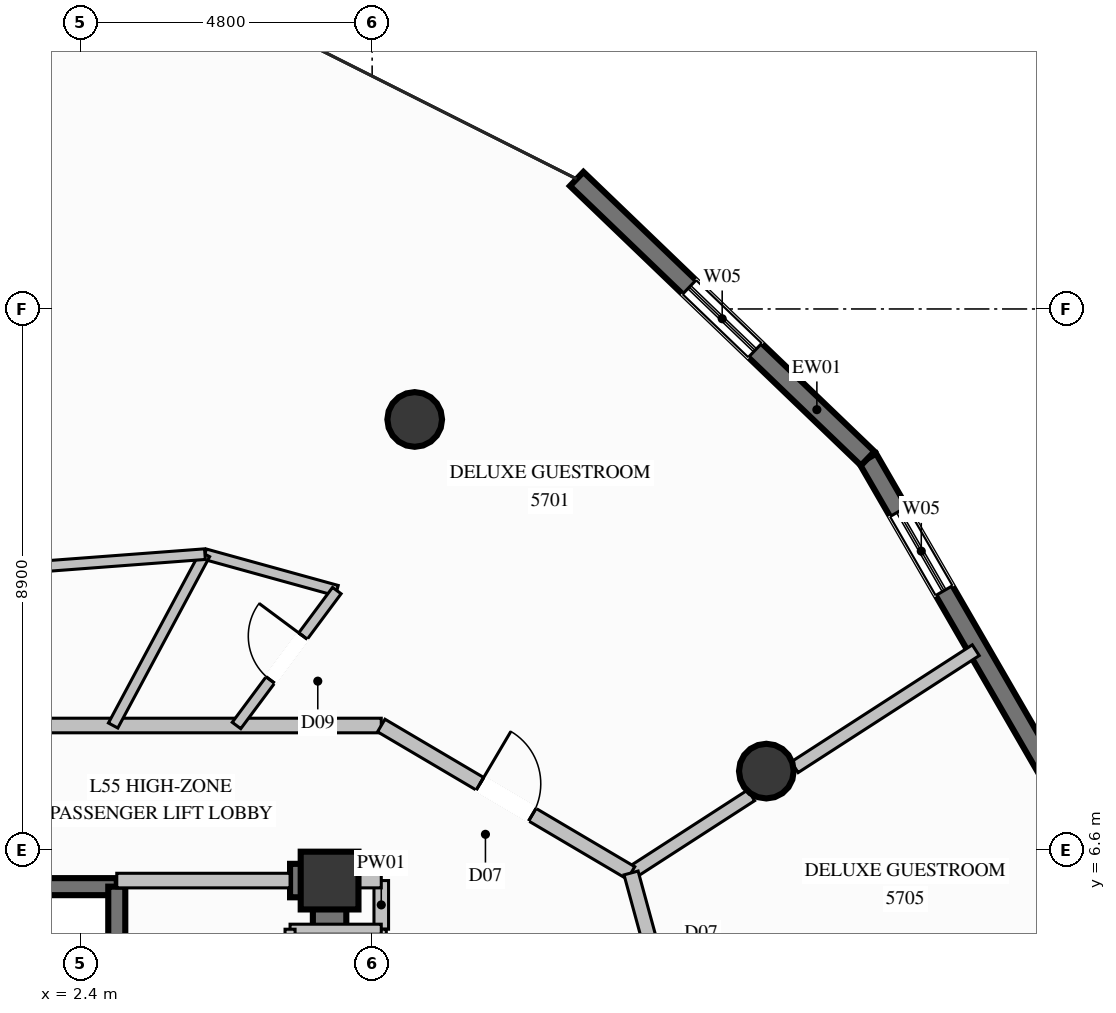
"""IFC4 building model, lengths in metres.
Left out: names, types, materials, properties, quantities, classifications, styles, units other than length and angle.
Written with IfcOpenShell. Run it as: python <this file> out.ifc"""

import sys

from ifc_helpers import new_model, si_unit, direction, frame, frame_2d, origin, origin_2d, place, context, subcontext, project, spatial, rectangle, circle, extrude, element, fill, save


model = new_model("IFC4")
c1 = context("Model", 3, precision=1e-05, world=origin(), true_north=direction((0.0, 1.0)))
c2 = subcontext(c1, "Body", "Model", "MODEL_VIEW")
j1 = project(units=[si_unit("LENGTHUNIT", "METRE"), si_unit("PLANEANGLEUNIT", "RADIAN")], contexts=[c1])
p1 = place(None, origin())
s1 = spatial("IfcSite", under=j1, at=p1, CompositionType="ELEMENT")
p2 = place(p1, origin())
s2 = spatial("IfcBuilding", under=s1, at=p2, CompositionType="ELEMENT")
p3 = place(p2, frame((0.0, 0.0, 212.8)))
s3 = spatial("IfcBuildingStorey", under=s2, at=p3, CompositionType="ELEMENT", Elevation=212.8)
p4 = place(p3, frame((6.5, 6.1, 0.0), z_axis=(0.0, 0.0, 1.0), x_axis=(1.0, 0.0, 0.0)))
e1 = element("IfcColumn", 1, at=p4, inside=s3, PredefinedType="COLUMN", context=c2, shape_type="SweptSolid", body=[
    extrude(rectangle(XDim=0.95, YDim=0.95, at=origin_2d()), origin(), (0.0, 0.0, 1.0), 3.6),
])
p5 = place(p3, frame((5.85, 6.1, 0.0), z_axis=(0.0, 0.0, 1.0), x_axis=(1.0, 0.0, 0.0)))
e2 = element("IfcWall", 2, at=p5, inside=s3, PredefinedType="SHEAR", context=c2, shape_type="SweptSolid", body=[
    extrude(rectangle(XDim=0.375, YDim=0.55, at=frame_2d((0.188, 0.0))), origin(), (0.0, 0.0, 1.0), 3.6),
])
p6 = place(p3, frame((6.5, 3.35, 0.0), z_axis=(0.0, 0.0, 1.0), x_axis=(0.0, 1.0, 0.0)))
e3 = element("IfcWall", 3, at=p6, inside=s3, PredefinedType="SHEAR", context=c2, shape_type="SweptSolid", body=[
    extrude(rectangle(XDim=3.025, YDim=0.55, at=frame_2d((1.512, 0.0))), origin(), (0.0, 0.0, 1.0), 3.6),
])
for number, where, z_axis, x_axis in (
    (4, (13.683, 7.9, 0.0), (0.0, 0.0, 1.0), (1.0, 0.0, 0.0)),
    (5, (7.9, 13.683, 0.0), (0.0, 0.0, 1.0), (1.0, 0.0, 0.0)),
):
    element("IfcColumn", number, at=place(p3, frame(where, z_axis=z_axis, x_axis=x_axis)), inside=s3, PredefinedType="COLUMN", context=c2, shape_type="SweptSolid", body=[
        extrude(circle(Radius=0.45, at=origin_2d()), origin(), (0.0, 0.0, 1.0), 3.6),
    ])
p7 = place(p3, frame((15.35, 13.041, 0.0), z_axis=(0.0, 0.0, 1.0), x_axis=(0.50061923795, -0.865667591281, 0.0)))
e6 = element("IfcWall", 6, at=p7, inside=s3, PredefinedType="SOLIDWALL", context=c2, shape_type="SweptSolid", body=[
    extrude(rectangle(XDim=6.786, YDim=0.32, at=frame_2d((3.393, 0.0))), origin(), (0.0, 0.0, 1.0), 3.36),
])
p8 = place(p7, frame((1.01, 0.0, 0.85)))
e7 = element("IfcOpeningElement", 7, at=p8, cuts=e6, PredefinedType="OPENING", context=c2, shape_type="SweptSolid", body=[
    extrude(rectangle(XDim=1.5, YDim=1.2, at=frame_2d((0.75, 0.6))), frame((0.0, 0.17, 0.0), z_axis=(0.0, -1.0, 0.0), x_axis=(1.0, 0.0, 0.0)), (0.0, 0.0, 1.0), 0.34),
])
p9 = place(p3, frame((10.564, 17.638, 0.0), z_axis=(0.0, 0.0, 1.0), x_axis=(0.721218944664, -0.69270717757, 0.0)))
e8 = element("IfcWall", 8, at=p9, inside=s3, PredefinedType="SOLIDWALL", context=c2, shape_type="SweptSolid", body=[
    extrude(rectangle(XDim=6.636, YDim=0.32, at=frame_2d((3.318, 0.0))), origin(), (0.0, 0.0, 1.0), 3.36),
])
p10 = place(p9, frame((2.568, 0.0, 0.85)))
e9 = element("IfcOpeningElement", 9, at=p10, cuts=e8, PredefinedType="OPENING", context=c2, shape_type="SweptSolid", body=[
    extrude(rectangle(XDim=1.5, YDim=1.2, at=frame_2d((0.75, 0.6))), frame((0.0, 0.17, 0.0), z_axis=(0.0, -1.0, 0.0), x_axis=(1.0, 0.0, 0.0)), (0.0, 0.0, 1.0), 0.34),
])
p11 = place(p3, frame((3.0, 6.0, 0.0), z_axis=(0.0, 0.0, 1.0), x_axis=(-1.0, 0.0, 0.0)))
e10 = element("IfcWall", 10, at=p11, inside=s3, PredefinedType="SOLIDWALL", context=c2, shape_type="SweptSolid", body=[
    extrude(rectangle(XDim=2.2, YDim=0.28, at=frame_2d((1.1, 0.0))), origin(), (0.0, 0.0, 1.0), 3.36),
])
p12 = place(p3, frame((3.0, 3.5, 0.0), z_axis=(0.0, 0.0, 1.0), x_axis=(0.0, 1.0, 0.0)))
e11 = element("IfcWall", 11, at=p12, inside=s3, PredefinedType="SOLIDWALL", context=c2, shape_type="SweptSolid", body=[
    extrude(rectangle(XDim=2.5, YDim=0.28, at=frame_2d((1.25, 0.0))), origin(), (0.0, 0.0, 1.0), 3.36),
])
p13 = place(p3, frame((-7.35, 8.65, 0.0), z_axis=(0.0, 0.0, 1.0), x_axis=(1.0, 0.0, 0.0)))
e12 = element("IfcWall", 12, at=p13, inside=s3, PredefinedType="PARTITIONING", context=c2, shape_type="SweptSolid", body=[
    extrude(rectangle(XDim=14.7, YDim=0.24, at=frame_2d((7.35, 0.0))), origin(), (0.0, 0.0, 1.0), 3.36),
])
p14 = place(p3, frame((3.0, 6.1, 0.0), z_axis=(0.0, 0.0, 1.0), x_axis=(1.0, 0.0, 0.0)))
e13 = element("IfcWall", 13, at=p14, inside=s3, PredefinedType="PARTITIONING", context=c2, shape_type="SweptSolid", body=[
    extrude(rectangle(XDim=2.85, YDim=0.24, at=frame_2d((1.425, 0.0))), origin(), (0.0, 0.0, 1.0), 2.445),
])
p15 = place(p3, frame((7.35, 5.3, 0.0), z_axis=(0.0, 0.0, 1.0), x_axis=(0.0, 1.0, 0.0)))
e14 = element("IfcWall", 14, at=p15, inside=s3, PredefinedType="PARTITIONING", context=c2, shape_type="SweptSolid", body=[
    extrude(rectangle(XDim=0.8, YDim=0.24, at=frame_2d((0.4, 0.0))), origin(), (0.0, 0.0, 1.0), 2.445),
])
p16 = place(p3, frame((6.5, 6.1, 0.0), z_axis=(0.0, 0.0, 1.0), x_axis=(1.0, 0.0, 0.0)))
e15 = element("IfcWall", 15, at=p16, inside=s3, PredefinedType="PARTITIONING", context=c2, shape_type="SweptSolid", body=[
    extrude(rectangle(XDim=0.85, YDim=0.24, at=frame_2d((0.425, 0.0))), origin(), (0.0, 0.0, 1.0), 2.876),
])
p17 = place(p3, frame((7.35, 2.75, 0.0), z_axis=(0.0, 0.0, 1.0), x_axis=(0.0, 1.0, 0.0)))
e16 = element("IfcWall", 16, at=p17, inside=s3, PredefinedType="PARTITIONING", context=c2, shape_type="SweptSolid", body=[
    extrude(rectangle(XDim=2.55, YDim=0.165, at=frame_2d((1.275, 0.0))), origin(), (0.0, 0.0, 1.0), 3.36),
])
p18 = place(p17, frame((0.8, 0.0, 0.0)))
e17 = element("IfcOpeningElement", 17, at=p18, cuts=e16, PredefinedType="OPENING", context=c2, shape_type="SweptSolid", body=[
    extrude(rectangle(XDim=0.95, YDim=2.1, at=frame_2d((0.475, 1.05))), frame((0.0, 0.093, 0.0), z_axis=(0.0, -1.0, 0.0), x_axis=(1.0, 0.0, 0.0)), (0.0, 0.0, 1.0), 0.185),
])
p19 = place(p3, frame((7.35, 5.3, 0.0), z_axis=(0.0, 0.0, 1.0), x_axis=(-1.0, 0.0, 0.0)))
e18 = element("IfcWall", 18, at=p19, inside=s3, PredefinedType="PARTITIONING", context=c2, shape_type="SweptSolid", body=[
    extrude(rectangle(XDim=1.5, YDim=0.165, at=frame_2d((0.75, 0.0))), origin(), (0.0, 0.0, 1.0), 2.445),
])
p20 = place(p3, frame((5.85, 5.3, 0.0), z_axis=(0.0, 0.0, 1.0), x_axis=(0.0, -1.0, 0.0)))
e19 = element("IfcWall", 19, at=p20, inside=s3, PredefinedType="PARTITIONING", context=c2, shape_type="SweptSolid", body=[
    extrude(rectangle(XDim=2.55, YDim=0.165, at=frame_2d((1.275, 0.0))), origin(), (0.0, 0.0, 1.0), 2.445),
])
p21 = place(p3, frame((11.458, 6.225, 0.0), z_axis=(0.0, 0.0, 1.0), x_axis=(0.839915213044, 0.542717638278, 0.0)))
e20 = element("IfcWall", 20, at=p21, inside=s3, PredefinedType="PARTITIONING", context=c2, shape_type="SweptSolid", body=[
    extrude(rectangle(XDim=2.353, YDim=0.21, at=frame_2d((1.176, 0.0))), origin(), (0.0, 0.0, 1.0), 2.876),
])
p22 = place(p3, frame((14.149, 7.964, 0.0), z_axis=(0.0, 0.0, 1.0), x_axis=(0.839972682267, 0.542628688004, 0.0)))
e21 = element("IfcWall", 21, at=p22, inside=s3, PredefinedType="PARTITIONING", context=c2, shape_type="SweptSolid", body=[
    extrude(rectangle(XDim=3.545, YDim=0.21, at=frame_2d((1.773, 0.0))), origin(), (0.0, 0.0, 1.0), 3.36),
])
p23 = place(p3, frame((4.45, 11.468, 0.0), z_axis=(0.0, 0.0, 1.0), x_axis=(0.963902406986, -0.266255797697, 0.0)))
e22 = element("IfcWall", 22, at=p23, inside=s3, PredefinedType="PLUMBINGWALL", context=c2, shape_type="SweptSolid", body=[
    extrude(rectangle(XDim=2.25, YDim=0.175, at=frame_2d((1.125, 0.0))), origin(), (0.0, 0.0, 1.0), 3.36),
])
p24 = place(p3, frame((4.45, 11.468, 0.0), z_axis=(0.0, 0.0, 1.0), x_axis=(-0.472295577566, -0.881440234736, 0.0)))
e23 = element("IfcWall", 23, at=p24, inside=s3, PredefinedType="PLUMBINGWALL", context=c2, shape_type="SweptSolid", body=[
    extrude(rectangle(XDim=3.197, YDim=0.175, at=frame_2d((1.599, 0.0))), origin(), (0.0, 0.0, 1.0), 3.36),
])
p25 = place(p3, frame((4.969, 8.65, 0.0), z_axis=(0.0, 0.0, 1.0), x_axis=(0.596675067376, 0.802482936872, 0.0)))
e24 = element("IfcWall", 24, at=p25, inside=s3, PredefinedType="PLUMBINGWALL", context=c2, shape_type="SweptSolid", body=[
    extrude(rectangle(XDim=2.765, YDim=0.175, at=frame_2d((1.383, 0.0))), origin(), (0.0, 0.0, 1.0), 3.36),
])
p26 = place(p25, frame((0.933, 0.0, 0.0)))
e25 = element("IfcOpeningElement", 25, at=p26, cuts=e24, PredefinedType="OPENING", context=c2, shape_type="SweptSolid", body=[
    extrude(rectangle(XDim=0.9, YDim=2.1, at=frame_2d((0.45, 1.05))), frame((0.0, 0.098, 0.0), z_axis=(0.0, -1.0, 0.0), x_axis=(1.0, 0.0, 0.0)), (0.0, 0.0, 1.0), 0.195),
])
p27 = place(p3, frame((7.35, 8.65, 0.0), z_axis=(0.0, 0.0, 1.0), x_axis=(0.861164858472, -0.508325768118, 0.0)))
e26 = element("IfcWall", 26, at=p27, inside=s3, PredefinedType="PARTITIONING", context=c2, shape_type="SweptSolid", body=[
    extrude(rectangle(XDim=4.77, YDim=0.24, at=frame_2d((2.385, 0.0))), origin(), (0.0, 0.0, 1.0), 3.36),
])
p28 = place(p27, frame((1.885, 0.0, 0.0)))
e27 = element("IfcOpeningElement", 27, at=p28, cuts=e26, PredefinedType="OPENING", context=c2, shape_type="SweptSolid", body=[
    extrude(rectangle(XDim=1.0, YDim=2.2, at=frame_2d((0.5, 1.1))), frame((0.0, 0.13, 0.0), z_axis=(0.0, -1.0, 0.0), x_axis=(1.0, 0.0, 0.0)), (0.0, 0.0, 1.0), 0.26),
])
p29 = place(p3, frame((0.753, 11.19, 0.0), z_axis=(0.0, 0.0, 1.0), x_axis=(0.997183202625, 0.075004402548, 0.0)))
e28 = element("IfcWall", 28, at=p29, inside=s3, PredefinedType="PLUMBINGWALL", context=c2, shape_type="SweptSolid", body=[
    extrude(rectangle(XDim=3.708, YDim=0.175, at=frame_2d((1.854, 0.0))), origin(), (0.0, 0.0, 1.0), 3.042),
])
p30 = place(p3, frame((12.468, 2.527, 0.0), z_axis=(0.0, 0.0, 1.0), x_axis=(-0.263473055226, 0.964666755502, 0.0)))
e29 = element("IfcWall", 29, at=p30, inside=s3, PredefinedType="PARTITIONING", context=c2, shape_type="SweptSolid", body=[
    extrude(rectangle(XDim=3.833, YDim=0.24, at=frame_2d((1.917, 0.0))), origin(), (0.0, 0.0, 1.0), 3.36),
])
p31 = place(p30, frame((1.417, 0.0, 0.0)))
e30 = element("IfcOpeningElement", 30, at=p31, cuts=e29, PredefinedType="OPENING", context=c2, shape_type="SweptSolid", body=[
    extrude(rectangle(XDim=1.0, YDim=2.2, at=frame_2d((0.5, 1.1))), frame((0.0, 0.13, 0.0), z_axis=(0.0, -1.0, 0.0), x_axis=(1.0, 0.0, 0.0)), (0.0, 0.0, 1.0), 0.26),
])
p32 = place(p8, origin())
e31 = element("IfcWindow", 31, at=p32, inside=s3, PartitioningType="SINGLE_PANEL", PredefinedType="WINDOW", context=c2, shape_type="SweptSolid", body=[
    extrude(rectangle(XDim=1.5, YDim=1.2, at=frame_2d((0.75, 0.6))), frame((0.0, 0.03, 0.0), z_axis=(0.0, -1.0, 0.0), x_axis=(1.0, 0.0, 0.0)), (0.0, 0.0, 1.0), 0.06),
])
fill(e7, e31)
p33 = place(p10, origin())
e32 = element("IfcWindow", 32, at=p33, inside=s3, PartitioningType="SINGLE_PANEL", PredefinedType="WINDOW", context=c2, shape_type="SweptSolid", body=[
    extrude(rectangle(XDim=1.5, YDim=1.2, at=frame_2d((0.75, 0.6))), frame((0.0, 0.03, 0.0), z_axis=(0.0, -1.0, 0.0), x_axis=(1.0, 0.0, 0.0)), (0.0, 0.0, 1.0), 0.06),
])
fill(e9, e32)
p34 = place(p26, origin())
e33 = element("IfcDoor", 33, at=p34, inside=s3, OperationType="SINGLE_SWING_RIGHT", PredefinedType="DOOR", context=c2, shape_type="SweptSolid", body=[
    extrude(rectangle(XDim=0.9, YDim=2.1, at=frame_2d((0.45, 1.05))), frame((0.0, 0.025, 0.0), z_axis=(0.0, -1.0, 0.0), x_axis=(1.0, 0.0, 0.0)), (0.0, 0.0, 1.0), 0.05),
])
fill(e25, e33)
p35 = place(p28, origin())
e34 = element("IfcDoor", 34, at=p35, inside=s3, OperationType="SINGLE_SWING_LEFT", PredefinedType="DOOR", context=c2, shape_type="SweptSolid", body=[
    extrude(rectangle(XDim=1.0, YDim=2.2, at=frame_2d((0.5, 1.1))), frame((0.0, 0.025, 0.0), z_axis=(0.0, -1.0, 0.0), x_axis=(1.0, 0.0, 0.0)), (0.0, 0.0, 1.0), 0.05),
])
fill(e27, e34)
save(model, sys.argv[1])
